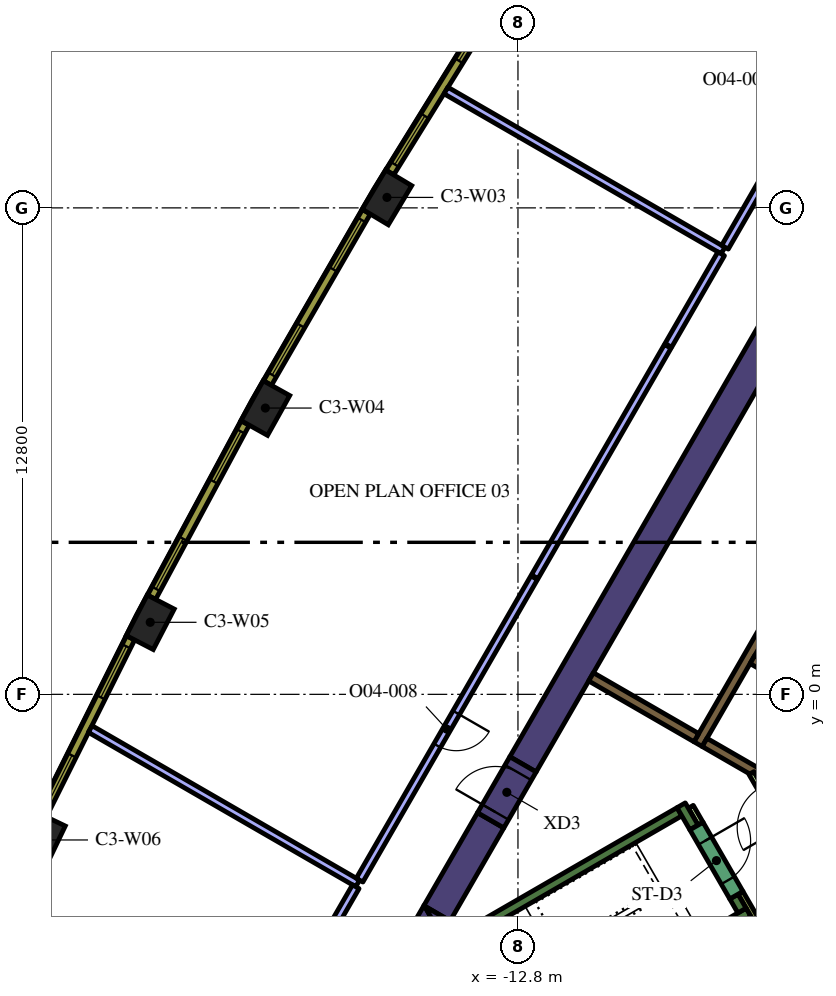
"""IFC4 building model, lengths in metres.
Left out: names, types, materials, properties, quantities, classifications, styles, units other than length and angle.
Written with IfcOpenShell. Run it as: python <this file> out.ifc"""

import sys

from ifc_helpers import new_model, si_unit, direction, frame, frame_2d, origin, origin_2d, place, context, subcontext, project, spatial, polyline, rectangle, outline, extrude, element, fill, save


model = new_model("IFC4")
c1 = context("Model", 3, precision=1e-05, world=origin(), true_north=direction((0.0, 1.0)))
c2 = subcontext(c1, "Body", "Model", "MODEL_VIEW")
j1 = project(units=[si_unit("LENGTHUNIT", "METRE"), si_unit("PLANEANGLEUNIT", "RADIAN")], contexts=[c1])
p1 = place(None, origin())
s1 = spatial("IfcSite", under=j1, at=p1, CompositionType="ELEMENT")
p2 = place(p1, origin())
s2 = spatial("IfcBuilding", under=s1, at=p2, CompositionType="ELEMENT")
p3 = place(p2, frame((0.0, 0.0, 179.4)))
s3 = spatial("IfcBuildingStorey", under=s2, at=p3, CompositionType="ELEMENT", Elevation=179.4)
for number, where, z_axis, x_axis in (
    (1, (-16.247, 13.075, 0.0), (0.0, 0.0, 1.0), (-0.513, -0.858, 0.0)),
    (2, (-19.447, 7.533, 0.0), (0.0, 0.0, 1.0), (-0.487, -0.874, 0.0)),
    (3, (-22.476, 1.896, 0.0), (0.0, 0.0, 1.0), (-0.46, -0.888, 0.0)),
    (4, (-25.332, -3.832, 0.0), (0.0, 0.0, 1.0), (-0.433, -0.902, 0.0)),
):
    element("IfcColumn", number, at=place(p3, frame(where, z_axis=z_axis, x_axis=x_axis)), inside=s3, PredefinedType="COLUMN", context=c2, shape_type="SweptSolid", body=[
        extrude(rectangle(XDim=1.2, YDim=0.8, at=origin_2d()), origin(), (0.0, 0.0, 1.0), 4.2),
    ])
p4 = place(p3, origin())
e5 = element("IfcWall", 5, at=p4, inside=s3, PredefinedType="SOLIDWALL", context=c2, shape_type="SweptSolid", body=[
    extrude(outline(polyline([(-15.047, -5.938), (-15.719, -6.326), (-15.271, -5.55), (-15.047, -5.938)])), origin(), (0.0, 0.0, 1.0), 4.2),
])
p5 = place(p3, frame((-13.518, -3.314, 0.0), z_axis=(0.0, 0.0, 1.0), x_axis=(-0.499969377405, -0.866043083026, 0.0)))
e6 = element("IfcWall", 6, at=p5, inside=s3, PredefinedType="SOLIDWALL", context=c2, shape_type="SweptSolid", body=[
    extrude(rectangle(XDim=2.824, YDim=0.8, at=frame_2d((1.412, 0.0))), origin(), (0.0, 0.0, 1.0), 4.2),
])
e7 = element("IfcWall", 7, at=p4, inside=s3, PredefinedType="SOLIDWALL", context=c2, shape_type="SweptSolid", body=[
    extrude(outline(polyline([(-14.809, -6.35), (-15.257, -5.574), (-14.585, -5.962), (-14.809, -6.35)])), origin(), (0.0, 0.0, 1.0), 4.2),
])
p6 = place(p3, frame((-12.668, -1.842, 0.0), z_axis=(0.0, 0.0, 1.0), x_axis=(0.500003640647, 0.866023301845, 0.0)))
e8 = element("IfcWall", 8, at=p6, inside=s3, PredefinedType="SOLIDWALL", context=c2, shape_type="SweptSolid", body=[
    extrude(rectangle(XDim=15.858, YDim=0.8, at=frame_2d((7.929, 0.0))), origin(), (0.0, 0.0, 1.0), 4.2),
])
p7 = place(p3, frame((-14.44, -6.49, 0.0), z_axis=(0.0, 0.0, 1.0), x_axis=(0.866022966069, 0.500004222222, 0.0)))
e9 = element("IfcWall", 9, at=p7, inside=s3, PredefinedType="SOLIDWALL", context=c2, shape_type="SweptSolid", body=[
    extrude(rectangle(XDim=6.8, YDim=0.25, at=frame_2d((3.4, 0.0))), origin(), (0.0, 0.0, 1.0), 4.2),
])
p8 = place(p3, frame((-8.168, -3.503, 0.0), z_axis=(0.0, 0.0, 1.0), x_axis=(-0.499952099219, 0.866053057547, 0.0)))
e10 = element("IfcWall", 10, at=p8, inside=s3, PredefinedType="SOLIDWALL", context=c2, shape_type="SweptSolid", body=[
    extrude(rectangle(XDim=0.675, YDim=0.25, at=frame_2d((0.337, 0.0))), origin(), (0.0, 0.0, 1.0), 4.2),
])
p9 = place(p3, frame((-12.84, -9.261, 0.0), z_axis=(0.0, 0.0, 1.0), x_axis=(0.866016039709, 0.500016218704, 0.0)))
e11 = element("IfcWall", 11, at=p9, inside=s3, PredefinedType="SOLIDWALL", context=c2, shape_type="SweptSolid", body=[
    extrude(rectangle(XDim=7.05, YDim=0.25, at=frame_2d((3.525, 0.0))), origin(), (0.0, 0.0, 1.0), 4.2),
])
p10 = place(p3, frame((-6.905, -5.69, 0.0), z_axis=(0.0, 0.0, 1.0), x_axis=(-0.500402024738, 0.865793170242, 0.0)))
e12 = element("IfcWall", 12, at=p10, inside=s3, PredefinedType="SOLIDWALL", context=c2, shape_type="SweptSolid", body=[
    extrude(rectangle(XDim=0.425, YDim=0.25, at=frame_2d((0.212, 0.0))), origin(), (0.0, 0.0, 1.0), 4.2),
])
p11 = place(p3, frame((-8.06, -1.311, 0.0), z_axis=(0.0, 0.0, 1.0), x_axis=(0.50000273126, 0.866023826885, 0.0)))
e13 = element("IfcWall", 13, at=p11, inside=s3, PredefinedType="SOLIDWALL", context=c2, shape_type="SweptSolid", body=[
    extrude(rectangle(XDim=10.33, YDim=0.25, at=frame_2d((5.165, 0.0))), origin(), (0.0, 0.0, 1.0), 4.2),
])
p12 = place(p3, frame((-4.724, -0.182, 0.0), z_axis=(0.0, 0.0, 1.0), x_axis=(-0.866008176907, 0.50002983664, 0.0)))
e14 = element("IfcWall", 14, at=p12, inside=s3, PredefinedType="SOLIDWALL", context=c2, shape_type="SweptSolid", body=[
    extrude(rectangle(XDim=2.2, YDim=0.25, at=frame_2d((1.1, 0.0))), origin(), (0.0, 0.0, 1.0), 4.2),
])
e15 = element("IfcWall", 15, at=p4, inside=s3, PredefinedType="SOLIDWALL", context=c2, shape_type="SweptSolid", body=[
    extrude(outline(polyline([(-5.922, -2.257), (-5.922, -2.257), (-5.705, -2.382), (-5.83, -2.598), (-6.483, -2.221), (-6.591, -2.033), (-6.591, -2.033), (-6.7, -2.096), (-7.952, -1.373), (-7.827, -1.156), (-5.922, -2.257)])), origin(), (0.0, 0.0, 1.0), 4.2),
])
p13 = place(p3, frame((-8.106, -1.14, 0.0), z_axis=(0.0, 0.0, 1.0), x_axis=(-0.866008981251, 0.500028443584, 0.0)))
e16 = element("IfcWall", 16, at=p13, inside=s3, PredefinedType="SOLIDWALL", context=c2, shape_type="SweptSolid", body=[
    extrude(rectangle(XDim=3.2, YDim=0.25, at=frame_2d((1.6, 0.0))), origin(), (0.0, 0.0, 1.0), 4.2),
])
p14 = place(p3, frame((-8.252, -2.958, 0.0), z_axis=(0.0, 0.0, 1.0), x_axis=(0.500174715838, -0.865924508047, 0.0)))
e17 = element("IfcWall", 17, at=p14, inside=s3, PredefinedType="PARTITIONING", context=c2, shape_type="SweptSolid", body=[
    extrude(rectangle(XDim=0.514, YDim=0.15, at=frame_2d((0.257, 0.0))), origin(), (0.0, 0.0, 1.0), 3.15),
])
p15 = place(p3, frame((-6.48, -6.027, 0.0), z_axis=(0.0, 0.0, 1.0), x_axis=(-0.499927229454, 0.866067413802, 0.0)))
e18 = element("IfcWall", 18, at=p15, inside=s3, PredefinedType="PARTITIONING", context=c2, shape_type="SweptSolid", body=[
    extrude(rectangle(XDim=0.929, YDim=0.15, at=frame_2d((0.464, 0.0))), origin(), (0.0, 0.0, 1.0), 4.2),
])
p16 = place(p3, frame((-8.103, -3.466, 0.0), z_axis=(0.0, 0.0, 1.0), x_axis=(0.500078061341, -0.865980330357, 0.0)))
e19 = element("IfcWall", 19, at=p16, inside=s3, PredefinedType="SOLIDWALL", context=c2, shape_type="SweptSolid", body=[
    extrude(rectangle(XDim=2.1, YDim=0.4, at=frame_2d((1.05, 0.0))), origin(), (0.0, 0.0, 1.0), 4.2),
])
p17 = place(p16, frame((0.45, 0.0, 0.0)))
e20 = element("IfcOpeningElement", 20, at=p17, cuts=e19, PredefinedType="OPENING", context=c2, shape_type="SweptSolid", body=[
    extrude(rectangle(XDim=1.2, YDim=2.1, at=frame_2d((0.6, 1.05))), frame((0.0, 0.21, 0.0), z_axis=(0.0, -1.0, 0.0), x_axis=(1.0, 0.0, 0.0)), (0.0, 0.0, 1.0), 0.42),
])
p18 = place(p3, frame((-5.606, -3.89, 0.0), z_axis=(0.0, 0.0, 1.0), x_axis=(-0.500027713859, 0.866009402589, 0.0)))
e21 = element("IfcWall", 21, at=p18, inside=s3, PredefinedType="PARTITIONING", context=c2, shape_type="SweptSolid", body=[
    extrude(rectangle(XDim=2.1, YDim=0.15, at=frame_2d((1.05, 0.0))), origin(), (0.0, 0.0, 1.0), 3.15),
])
p19 = place(p18, frame((0.45, 0.0, 0.0)))
e22 = element("IfcOpeningElement", 22, at=p19, cuts=e21, PredefinedType="OPENING", context=c2, shape_type="SweptSolid", body=[
    extrude(rectangle(XDim=1.2, YDim=2.1, at=frame_2d((0.6, 1.05))), frame((0.0, 0.085, 0.0), z_axis=(0.0, -1.0, 0.0), x_axis=(1.0, 0.0, 0.0)), (0.0, 0.0, 1.0), 0.17),
])
p20 = place(p3, frame((-13.518, -3.314, 0.0), z_axis=(0.0, 0.0, 1.0), x_axis=(0.500000056704, 0.866025371046, 0.0)))
e23 = element("IfcWall", 23, at=p20, inside=s3, PredefinedType="SOLIDWALL", context=c2, shape_type="SweptSolid", body=[
    extrude(rectangle(XDim=1.7, YDim=0.8, at=frame_2d((0.85, 0.0))), origin(), (0.0, 0.0, 1.0), 4.2),
])
p21 = place(p20, frame((0.25, 0.0, 0.0)))
e24 = element("IfcOpeningElement", 24, at=p21, cuts=e23, PredefinedType="OPENING", context=c2, shape_type="SweptSolid", body=[
    extrude(rectangle(XDim=1.2, YDim=2.1, at=frame_2d((0.6, 1.05))), frame((0.0, 0.41, 0.0), z_axis=(0.0, -1.0, 0.0), x_axis=(1.0, 0.0, 0.0)), (0.0, 0.0, 1.0), 0.82),
])
p22 = place(p3, frame((-7.403, 11.678, 0.0), z_axis=(0.0, 0.0, 1.0), x_axis=(-0.866029143232, 0.499993523031, 0.0)))
e25 = element("IfcWall", 25, at=p22, inside=s3, PredefinedType="PARTITIONING", context=c2, shape_type="SweptSolid", body=[
    extrude(rectangle(XDim=8.42, YDim=0.2, at=frame_2d((4.21, 0.0))), origin(), (0.0, 0.0, 1.0), 3.15),
])
p23 = place(p3, frame((-3.421, 18.574, 0.0), z_axis=(0.0, 0.0, 1.0), x_axis=(-0.499989434416, -0.866031503741, 0.0)))
e26 = element("IfcWall", 26, at=p23, inside=s3, PredefinedType="PARTITIONING", context=c2, shape_type="SweptSolid", body=[
    extrude(rectangle(XDim=7.863, YDim=0.2, at=frame_2d((3.932, 0.0))), origin(), (0.0, 0.0, 1.0), 3.15),
])
p24 = place(p23, frame((3.4, 0.0, 0.0)))
e27 = element("IfcOpeningElement", 27, at=p24, cuts=e26, PredefinedType="OPENING", context=c2, shape_type="SweptSolid", body=[
    extrude(rectangle(XDim=1.0, YDim=2.1, at=frame_2d((0.5, 1.05))), frame((0.0, 0.11, 0.0), z_axis=(0.0, -1.0, 0.0), x_axis=(1.0, 0.0, 0.0)), (0.0, 0.0, 1.0), 0.22),
])
p25 = place(p3, frame((-17.018, -4.976, 0.0), z_axis=(0.0, 0.0, 1.0), x_axis=(-0.866034495264, 0.499984252764, 0.0)))
e28 = element("IfcWall", 28, at=p25, inside=s3, PredefinedType="PARTITIONING", context=c2, shape_type="SweptSolid", body=[
    extrude(rectangle(XDim=8.126, YDim=0.2, at=frame_2d((4.063, 0.0))), origin(), (0.0, 0.0, 1.0), 3.15),
])
p26 = place(p3, frame((-8.859, 9.156, 0.0), z_axis=(0.0, 0.0, 1.0), x_axis=(-0.500010275428, -0.866019471182, 0.0)))
e29 = element("IfcWall", 29, at=p26, inside=s3, PredefinedType="PARTITIONING", context=c2, shape_type="SweptSolid", body=[
    extrude(rectangle(XDim=7.0, YDim=0.2, at=frame_2d((3.5, 0.0))), origin(), (0.0, 0.0, 1.0), 3.15),
])
p27 = place(p3, frame((-12.374, 3.068, 0.0), z_axis=(0.0, 0.0, 1.0), x_axis=(-0.50000000053, -0.866025403479, 0.0)))
e30 = element("IfcWall", 30, at=p27, inside=s3, PredefinedType="PARTITIONING", context=c2, shape_type="SweptSolid", body=[
    extrude(rectangle(XDim=9.188, YDim=0.2, at=frame_2d((4.594, 0.0))), origin(), (0.0, 0.0, 1.0), 3.15),
])
p28 = place(p27, frame((4.1, 0.0, 0.0)))
e31 = element("IfcOpeningElement", 31, at=p28, cuts=e30, PredefinedType="OPENING", context=c2, shape_type="SweptSolid", body=[
    extrude(rectangle(XDim=1.0, YDim=2.1, at=frame_2d((0.5, 1.05))), frame((0.0, 0.11, 0.0), z_axis=(0.0, -1.0, 0.0), x_axis=(1.0, 0.0, 0.0)), (0.0, 0.0, 1.0), 0.22),
])
p29 = place(p3, frame((-7.453, 11.591, 0.0), z_axis=(0.0, 0.0, 1.0), x_axis=(-0.499980749935, -0.866036517529, 0.0)))
e32 = element("IfcWall", 32, at=p29, inside=s3, PredefinedType="PARTITIONING", context=c2, shape_type="SweptSolid", body=[
    extrude(rectangle(XDim=2.782, YDim=0.2, at=frame_2d((1.391, 0.0))), origin(), (0.0, 0.0, 1.0), 3.15),
])
p30 = place(p3, frame((-17.068, -5.062, 0.0), z_axis=(0.0, 0.0, 1.0), x_axis=(-0.499935638681, -0.86606255962, 0.0)))
e33 = element("IfcWall", 33, at=p30, inside=s3, PredefinedType="PARTITIONING", context=c2, shape_type="SweptSolid", body=[
    extrude(rectangle(XDim=1.487, YDim=0.2, at=frame_2d((0.744, 0.0))), origin(), (0.0, 0.0, 1.0), 3.15),
])
p31 = place(p3, frame((-13.433, 18.156, 0.0), z_axis=(0.0, 0.0, 1.0), x_axis=(-0.526197926587, -0.850362124072, 0.0)))
e34 = element("IfcWall", 34, at=p31, inside=s3, PredefinedType="SOLIDWALL", context=c2, shape_type="SweptSolid", body=[
    extrude(rectangle(XDim=5.203, YDim=0.24, at=frame_2d((2.602, 0.0))), origin(), (0.0, 0.0, 1.0), 3.95),
])
p32 = place(p31, frame((0.248, 0.0, 0.9)))
e35 = element("IfcOpeningElement", 35, at=p32, cuts=e34, PredefinedType="OPENING", context=c2, shape_type="SweptSolid", body=[
    extrude(rectangle(XDim=1.5, YDim=2.55, at=frame_2d((0.75, 1.275))), frame((0.0, 0.13, 0.0), z_axis=(0.0, -1.0, 0.0), x_axis=(1.0, 0.0, 0.0)), (0.0, 0.0, 1.0), 0.26),
])
p33 = place(p31, frame((3.455, 0.0, 0.9)))
e36 = element("IfcOpeningElement", 36, at=p33, cuts=e34, PredefinedType="OPENING", context=c2, shape_type="SweptSolid", body=[
    extrude(rectangle(XDim=1.5, YDim=2.55, at=frame_2d((0.75, 1.275))), frame((0.0, 0.13, 0.0), z_axis=(0.0, -1.0, 0.0), x_axis=(1.0, 0.0, 0.0)), (0.0, 0.0, 1.0), 0.26),
])
p34 = place(p3, frame((-16.789, 12.697, 0.0), z_axis=(0.0, 0.0, 1.0), x_axis=(-0.500009456303, -0.866019944116, 0.0)))
e37 = element("IfcWall", 37, at=p34, inside=s3, PredefinedType="SOLIDWALL", context=c2, shape_type="SweptSolid", body=[
    extrude(rectangle(XDim=5.204, YDim=0.24, at=frame_2d((2.602, 0.0))), origin(), (0.0, 0.0, 1.0), 3.95),
])
p35 = place(p34, frame((0.248, 0.0, 0.9)))
e38 = element("IfcOpeningElement", 38, at=p35, cuts=e37, PredefinedType="OPENING", context=c2, shape_type="SweptSolid", body=[
    extrude(rectangle(XDim=1.5, YDim=2.55, at=frame_2d((0.75, 1.275))), frame((0.0, 0.13, 0.0), z_axis=(0.0, -1.0, 0.0), x_axis=(1.0, 0.0, 0.0)), (0.0, 0.0, 1.0), 0.26),
])
p36 = place(p34, frame((3.455, 0.0, 0.9)))
e39 = element("IfcOpeningElement", 39, at=p36, cuts=e37, PredefinedType="OPENING", context=c2, shape_type="SweptSolid", body=[
    extrude(rectangle(XDim=1.5, YDim=2.55, at=frame_2d((0.75, 1.275))), frame((0.0, 0.13, 0.0), z_axis=(0.0, -1.0, 0.0), x_axis=(1.0, 0.0, 0.0)), (0.0, 0.0, 1.0), 0.26),
])
p37 = place(p3, frame((-19.977, 7.139, 0.0), z_axis=(0.0, 0.0, 1.0), x_axis=(-0.473349833294, -0.880874528704, 0.0)))
e40 = element("IfcWall", 40, at=p37, inside=s3, PredefinedType="SOLIDWALL", context=c2, shape_type="SweptSolid", body=[
    extrude(rectangle(XDim=5.204, YDim=0.24, at=frame_2d((2.602, 0.0))), origin(), (0.0, 0.0, 1.0), 3.95),
])
p38 = place(p37, frame((0.248, 0.0, 0.9)))
e41 = element("IfcOpeningElement", 41, at=p38, cuts=e40, PredefinedType="OPENING", context=c2, shape_type="SweptSolid", body=[
    extrude(rectangle(XDim=1.5, YDim=2.55, at=frame_2d((0.75, 1.275))), frame((0.0, 0.13, 0.0), z_axis=(0.0, -1.0, 0.0), x_axis=(1.0, 0.0, 0.0)), (0.0, 0.0, 1.0), 0.26),
])
p39 = place(p37, frame((3.455, 0.0, 0.9)))
e42 = element("IfcOpeningElement", 42, at=p39, cuts=e40, PredefinedType="OPENING", context=c2, shape_type="SweptSolid", body=[
    extrude(rectangle(XDim=1.5, YDim=2.55, at=frame_2d((0.75, 1.275))), frame((0.0, 0.13, 0.0), z_axis=(0.0, -1.0, 0.0), x_axis=(1.0, 0.0, 0.0)), (0.0, 0.0, 1.0), 0.26),
])
p40 = place(p3, frame((-22.994, 1.485, 0.0), z_axis=(0.0, 0.0, 1.0), x_axis=(-0.446256171312, -0.8949052629, 0.0)))
e43 = element("IfcWall", 43, at=p40, inside=s3, PredefinedType="SOLIDWALL", context=c2, shape_type="SweptSolid", body=[
    extrude(rectangle(XDim=5.203, YDim=0.24, at=frame_2d((2.602, 0.0))), origin(), (0.0, 0.0, 1.0), 3.95),
])
p41 = place(p40, frame((0.248, 0.0, 0.9)))
e44 = element("IfcOpeningElement", 44, at=p41, cuts=e43, PredefinedType="OPENING", context=c2, shape_type="SweptSolid", body=[
    extrude(rectangle(XDim=1.5, YDim=2.55, at=frame_2d((0.75, 1.275))), frame((0.0, 0.13, 0.0), z_axis=(0.0, -1.0, 0.0), x_axis=(1.0, 0.0, 0.0)), (0.0, 0.0, 1.0), 0.26),
])
p42 = place(p40, frame((3.455, 0.0, 0.9)))
e45 = element("IfcOpeningElement", 45, at=p42, cuts=e43, PredefinedType="OPENING", context=c2, shape_type="SweptSolid", body=[
    extrude(rectangle(XDim=1.5, YDim=2.55, at=frame_2d((0.75, 1.275))), frame((0.0, 0.13, 0.0), z_axis=(0.0, -1.0, 0.0), x_axis=(1.0, 0.0, 0.0)), (0.0, 0.0, 1.0), 0.26),
])
p43 = place(p17, origin())
e46 = element("IfcDoor", 46, at=p43, inside=s3, OperationType="SINGLE_SWING_LEFT", PredefinedType="DOOR", context=c2, shape_type="SweptSolid", body=[
    extrude(rectangle(XDim=1.2, YDim=2.1, at=frame_2d((0.6, 1.05))), frame((0.0, 0.025, 0.0), z_axis=(0.0, -1.0, 0.0), x_axis=(1.0, 0.0, 0.0)), (0.0, 0.0, 1.0), 0.05),
])
fill(e20, e46)
p44 = place(p21, origin())
e47 = element("IfcDoor", 47, at=p44, inside=s3, OperationType="SINGLE_SWING_LEFT", PredefinedType="DOOR", context=c2, shape_type="SweptSolid", body=[
    extrude(rectangle(XDim=1.2, YDim=2.1, at=frame_2d((0.6, 1.05))), frame((0.0, 0.025, 0.0), z_axis=(0.0, -1.0, 0.0), x_axis=(1.0, 0.0, 0.0)), (0.0, 0.0, 1.0), 0.05),
])
fill(e24, e47)
p45 = place(p28, origin())
e48 = element("IfcDoor", 48, at=p45, inside=s3, OperationType="SINGLE_SWING_RIGHT", PredefinedType="DOOR", context=c2, shape_type="SweptSolid", body=[
    extrude(rectangle(XDim=1.0, YDim=2.1, at=frame_2d((0.5, 1.05))), frame((0.0, 0.025, 0.0), z_axis=(0.0, -1.0, 0.0), x_axis=(1.0, 0.0, 0.0)), (0.0, 0.0, 1.0), 0.05),
])
fill(e31, e48)
p46 = place(p32, origin())
e49 = element("IfcWindow", 49, at=p46, inside=s3, PartitioningType="SINGLE_PANEL", PredefinedType="WINDOW", context=c2, shape_type="SweptSolid", body=[
    extrude(rectangle(XDim=1.5, YDim=2.55, at=frame_2d((0.75, 1.275))), frame((0.0, 0.04, 0.0), z_axis=(0.0, -1.0, 0.0), x_axis=(1.0, 0.0, 0.0)), (0.0, 0.0, 1.0), 0.06),
])
fill(e35, e49)
p47 = place(p33, origin())
e50 = element("IfcWindow", 50, at=p47, inside=s3, PartitioningType="SINGLE_PANEL", PredefinedType="WINDOW", context=c2, shape_type="SweptSolid", body=[
    extrude(rectangle(XDim=1.5, YDim=2.55, at=frame_2d((0.75, 1.275))), frame((0.0, 0.04, 0.0), z_axis=(0.0, -1.0, 0.0), x_axis=(1.0, 0.0, 0.0)), (0.0, 0.0, 1.0), 0.06),
])
fill(e36, e50)
p48 = place(p35, origin())
e51 = element("IfcWindow", 51, at=p48, inside=s3, PartitioningType="SINGLE_PANEL", PredefinedType="WINDOW", context=c2, shape_type="SweptSolid", body=[
    extrude(rectangle(XDim=1.5, YDim=2.55, at=frame_2d((0.75, 1.275))), frame((0.0, 0.04, 0.0), z_axis=(0.0, -1.0, 0.0), x_axis=(1.0, 0.0, 0.0)), (0.0, 0.0, 1.0), 0.06),
])
fill(e38, e51)
p49 = place(p36, origin())
e52 = element("IfcWindow", 52, at=p49, inside=s3, PartitioningType="SINGLE_PANEL", PredefinedType="WINDOW", context=c2, shape_type="SweptSolid", body=[
    extrude(rectangle(XDim=1.5, YDim=2.55, at=frame_2d((0.75, 1.275))), frame((0.0, 0.04, 0.0), z_axis=(0.0, -1.0, 0.0), x_axis=(1.0, 0.0, 0.0)), (0.0, 0.0, 1.0), 0.06),
])
fill(e39, e52)
p50 = place(p38, origin())
e53 = element("IfcWindow", 53, at=p50, inside=s3, PartitioningType="SINGLE_PANEL", PredefinedType="WINDOW", context=c2, shape_type="SweptSolid", body=[
    extrude(rectangle(XDim=1.5, YDim=2.55, at=frame_2d((0.75, 1.275))), frame((0.0, 0.04, 0.0), z_axis=(0.0, -1.0, 0.0), x_axis=(1.0, 0.0, 0.0)), (0.0, 0.0, 1.0), 0.06),
])
fill(e41, e53)
p51 = place(p39, origin())
e54 = element("IfcWindow", 54, at=p51, inside=s3, PartitioningType="SINGLE_PANEL", PredefinedType="WINDOW", context=c2, shape_type="SweptSolid", body=[
    extrude(rectangle(XDim=1.5, YDim=2.55, at=frame_2d((0.75, 1.275))), frame((0.0, 0.04, 0.0), z_axis=(0.0, -1.0, 0.0), x_axis=(1.0, 0.0, 0.0)), (0.0, 0.0, 1.0), 0.06),
])
fill(e42, e54)
p52 = place(p41, origin())
e55 = element("IfcWindow", 55, at=p52, inside=s3, PartitioningType="SINGLE_PANEL", PredefinedType="WINDOW", context=c2, shape_type="SweptSolid", body=[
    extrude(rectangle(XDim=1.5, YDim=2.55, at=frame_2d((0.75, 1.275))), frame((0.0, 0.04, 0.0), z_axis=(0.0, -1.0, 0.0), x_axis=(1.0, 0.0, 0.0)), (0.0, 0.0, 1.0), 0.06),
])
fill(e44, e55)
p53 = place(p42, origin())
e56 = element("IfcWindow", 56, at=p53, inside=s3, PartitioningType="SINGLE_PANEL", PredefinedType="WINDOW", context=c2, shape_type="SweptSolid", body=[
    extrude(rectangle(XDim=1.5, YDim=2.55, at=frame_2d((0.75, 1.275))), frame((0.0, 0.04, 0.0), z_axis=(0.0, -1.0, 0.0), x_axis=(1.0, 0.0, 0.0)), (0.0, 0.0, 1.0), 0.06),
])
fill(e45, e56)
save(model, sys.argv[1])
